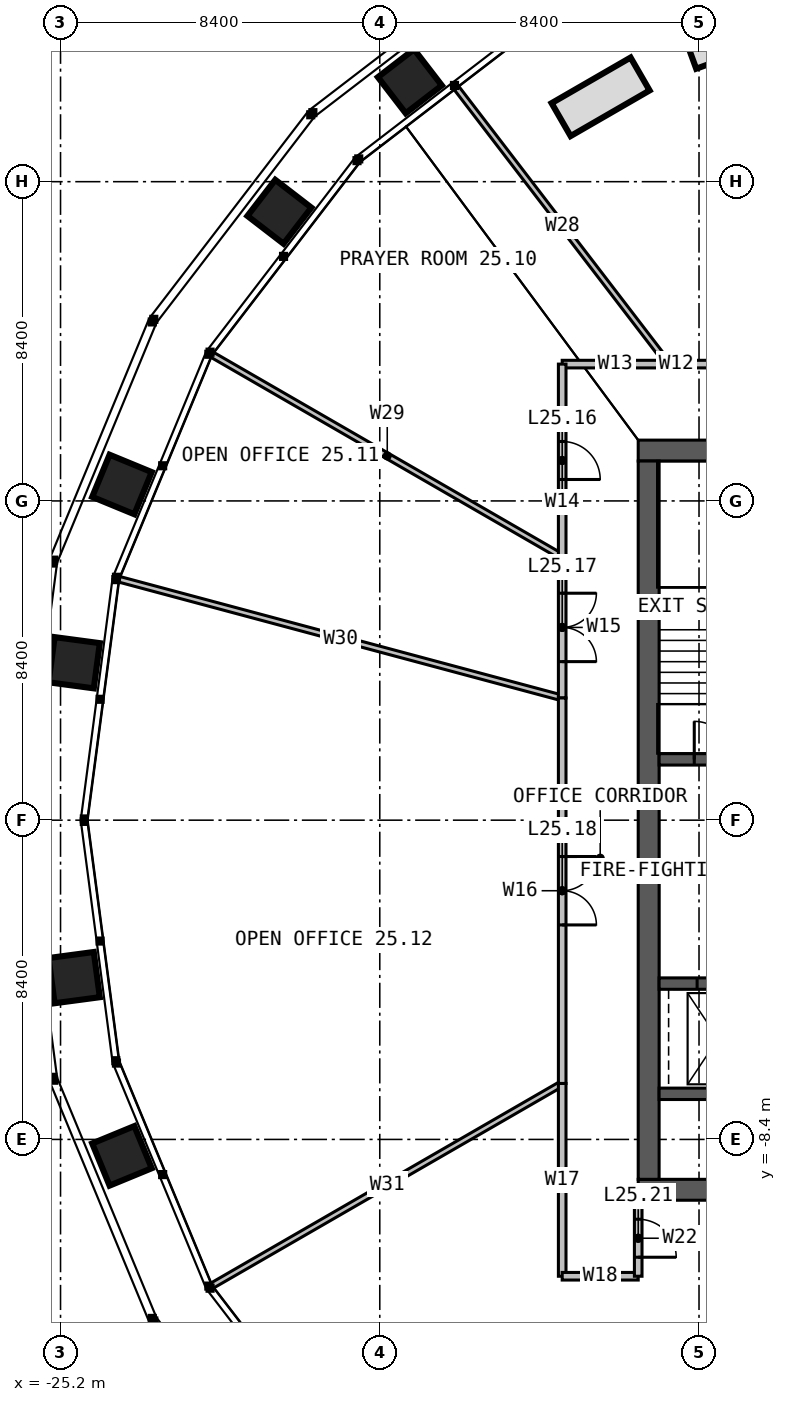
"""IFC4 building model, lengths in metres.
Left out: names, types, materials, properties, quantities, classifications, styles, units other than length and angle.
Written with IfcOpenShell. Run it as: python <this file> out.ifc"""

import sys

from ifc_helpers import new_model, si_unit, direction, frame, frame_2d, origin, place, context, subcontext, project, spatial, rectangle, extrude, element, fill, save


model = new_model("IFC4")
c1 = context("Model", 3, precision=1e-05, world=origin(), true_north=direction((0.0, 1.0)))
c2 = subcontext(c1, "Body", "Model", "MODEL_VIEW")
j1 = project(units=[si_unit("LENGTHUNIT", "METRE"), si_unit("PLANEANGLEUNIT", "RADIAN")], contexts=[c1])
p1 = place(None, origin())
s1 = spatial("IfcSite", under=j1, at=p1, CompositionType="ELEMENT")
p2 = place(p1, origin())
s2 = spatial("IfcBuilding", under=s1, at=p2, CompositionType="ELEMENT")
p3 = place(p2, frame((0.0, 0.0, 106.0)))
s3 = spatial("IfcBuildingStorey", under=s2, at=p3, CompositionType="ELEMENT", Elevation=106.0)
p4 = place(p3, frame((-10.0, 9.725, 0.0), z_axis=(0.0, 0.0, 1.0), x_axis=(1.0, 0.0, 0.0)))
e1 = element("IfcWall", 1, at=p4, inside=s3, PredefinedType="SOLIDWALL", context=c2, shape_type="SweptSolid", body=[
    extrude(rectangle(XDim=20.0, YDim=0.55, at=frame_2d((10.0, 0.0))), origin(), (0.0, 0.0, 1.0), 4.0),
])
p5 = place(p4, frame((9.4, 0.0, 0.0)))
e2 = element("IfcOpeningElement", 2, at=p5, cuts=e1, PredefinedType="OPENING", context=c2, shape_type="SweptSolid", body=[
    extrude(rectangle(XDim=1.2, YDim=2.2, at=frame_2d((0.6, 1.1))), frame((0.0, 0.285, 0.0), z_axis=(0.0, -1.0, 0.0), x_axis=(1.0, 0.0, 0.0)), (0.0, 0.0, 1.0), 0.57),
])
p6 = place(p3, frame((10.0, -9.725, 0.0), z_axis=(0.0, 0.0, 1.0), x_axis=(-1.0, 0.0, 0.0)))
e3 = element("IfcWall", 3, at=p6, inside=s3, PredefinedType="SOLIDWALL", context=c2, shape_type="SweptSolid", body=[
    extrude(rectangle(XDim=20.0, YDim=0.55, at=frame_2d((10.0, 0.0))), origin(), (0.0, 0.0, 1.0), 4.0),
])
p7 = place(p6, frame((6.875, 0.0, 0.0)))
e4 = element("IfcOpeningElement", 4, at=p7, cuts=e3, PredefinedType="OPENING", context=c2, shape_type="SweptSolid", body=[
    extrude(rectangle(XDim=1.2, YDim=2.2, at=frame_2d((0.6, 1.1))), frame((0.0, 0.285, 0.0), z_axis=(0.0, -1.0, 0.0), x_axis=(1.0, 0.0, 0.0)), (0.0, 0.0, 1.0), 0.57),
])
p8 = place(p3, frame((-9.725, 9.45, 0.0), z_axis=(0.0, 0.0, 1.0), x_axis=(0.0, -1.0, 0.0)))
e5 = element("IfcWall", 5, at=p8, inside=s3, PredefinedType="SOLIDWALL", context=c2, shape_type="SweptSolid", body=[
    extrude(rectangle(XDim=18.9, YDim=0.55, at=frame_2d((9.45, 0.0))), origin(), (0.0, 0.0, 1.0), 4.0),
])
p9 = place(p3, frame((-9.45, 1.6, 0.0), z_axis=(0.0, 0.0, 1.0), x_axis=(1.0, 0.0, 0.0)))
e6 = element("IfcWall", 6, at=p9, inside=s3, PredefinedType="SOLIDWALL", context=c2, shape_type="SweptSolid", body=[
    extrude(rectangle(XDim=2.85, YDim=0.3, at=frame_2d((1.425, 0.0))), origin(), (0.0, 0.0, 1.0), 4.0),
])
p10 = place(p9, frame((0.925, 0.0, 0.0)))
e7 = element("IfcOpeningElement", 7, at=p10, cuts=e6, PredefinedType="OPENING", context=c2, shape_type="SweptSolid", body=[
    extrude(rectangle(XDim=1.0, YDim=2.2, at=frame_2d((0.5, 1.1))), frame((0.0, 0.16, 0.0), z_axis=(0.0, -1.0, 0.0), x_axis=(1.0, 0.0, 0.0)), (0.0, 0.0, 1.0), 0.32),
])
p11 = place(p3, frame((-9.45, -4.3, 0.0), z_axis=(0.0, 0.0, 1.0), x_axis=(1.0, 0.0, 0.0)))
e8 = element("IfcWall", 8, at=p11, inside=s3, PredefinedType="SOLIDWALL", context=c2, shape_type="SweptSolid", body=[
    extrude(rectangle(XDim=2.85, YDim=0.3, at=frame_2d((1.425, 0.0))), origin(), (0.0, 0.0, 1.0), 4.0),
])
p12 = place(p11, frame((1.0, 0.0, 0.0)))
e9 = element("IfcOpeningElement", 9, at=p12, cuts=e8, PredefinedType="OPENING", context=c2, shape_type="SweptSolid", body=[
    extrude(rectangle(XDim=1.1, YDim=2.2, at=frame_2d((0.55, 1.1))), frame((0.0, 0.16, 0.0), z_axis=(0.0, -1.0, 0.0), x_axis=(1.0, 0.0, 0.0)), (0.0, 0.0, 1.0), 0.32),
])
p13 = place(p3, frame((-9.45, -7.2, 0.0), z_axis=(0.0, 0.0, 1.0), x_axis=(1.0, 0.0, 0.0)))
e10 = element("IfcWall", 10, at=p13, inside=s3, PredefinedType="SOLIDWALL", context=c2, shape_type="SweptSolid", body=[
    extrude(rectangle(XDim=2.85, YDim=0.3, at=frame_2d((1.425, 0.0))), origin(), (0.0, 0.0, 1.0), 4.0),
])
p14 = place(p3, frame((-9.207, 12.0, 0.0), z_axis=(0.0, 0.0, 1.0), x_axis=(-0.608747337947, 0.793364152544, 0.0)))
e11 = element("IfcWall", 11, at=p14, inside=s3, PredefinedType="PARTITIONING", context=c2, shape_type="SweptSolid", body=[
    extrude(rectangle(XDim=9.152, YDim=0.15, at=frame_2d((4.576, 0.0))), origin(), (0.0, 0.0, 1.0), 2.79),
])
p15 = place(p3, frame((-12.0, 6.928, 0.0), z_axis=(0.0, 0.0, 1.0), x_axis=(-0.866024197053, 0.500002090115, 0.0)))
e12 = element("IfcWall", 12, at=p15, inside=s3, PredefinedType="PARTITIONING", context=c2, shape_type="SweptSolid", body=[
    extrude(rectangle(XDim=10.631, YDim=0.15, at=frame_2d((5.315, 0.0))), origin(), (0.0, 0.0, 1.0), 2.79),
])
p16 = place(p3, frame((-12.0, 3.215, 0.0), z_axis=(0.0, 0.0, 1.0), x_axis=(-0.965926913807, 0.258814986396, 0.0)))
e13 = element("IfcWall", 13, at=p16, inside=s3, PredefinedType="PARTITIONING", context=c2, shape_type="SweptSolid", body=[
    extrude(rectangle(XDim=12.064, YDim=0.15, at=frame_2d((6.032, 0.0))), origin(), (0.0, 0.0, 1.0), 2.79),
])
p17 = place(p3, frame((-12.0, -6.928, 0.0), z_axis=(0.0, 0.0, 1.0), x_axis=(-0.866024197053, -0.500002090115, 0.0)))
e14 = element("IfcWall", 14, at=p17, inside=s3, PredefinedType="PARTITIONING", context=c2, shape_type="SweptSolid", body=[
    extrude(rectangle(XDim=10.631, YDim=0.15, at=frame_2d((5.315, 0.0))), origin(), (0.0, 0.0, 1.0), 2.79),
])
p18 = place(p3, frame((1.579, 12.0, 0.0), z_axis=(0.0, 0.0, 1.0), x_axis=(-1.0, 0.0, 0.0)))
e15 = element("IfcWall", 15, at=p18, inside=s3, PredefinedType="PARTITIONING", context=c2, shape_type="SweptSolid", body=[
    extrude(rectangle(XDim=10.363, YDim=0.2, at=frame_2d((5.182, 0.0))), origin(), (0.0, 0.0, 1.0), 3.2),
])
p19 = place(p18, frame((4.493, 0.0, 0.0)))
e16 = element("IfcOpeningElement", 16, at=p19, cuts=e15, PredefinedType="OPENING", context=c2, shape_type="SweptSolid", body=[
    extrude(rectangle(XDim=1.8, YDim=2.2, at=frame_2d((0.9, 1.1))), frame((0.0, 0.11, 0.0), z_axis=(0.0, -1.0, 0.0), x_axis=(1.0, 0.0, 0.0)), (0.0, 0.0, 1.0), 0.22),
])
p20 = place(p3, frame((-8.784, 12.0, 0.0), z_axis=(0.0, 0.0, 1.0), x_axis=(-1.0, 0.0, 0.0)))
e17 = element("IfcWall", 17, at=p20, inside=s3, PredefinedType="PARTITIONING", context=c2, shape_type="SweptSolid", body=[
    extrude(rectangle(XDim=0.424, YDim=0.2, at=frame_2d((0.212, 0.0))), origin(), (0.0, 0.0, 1.0), 3.8),
])
p21 = place(p3, frame((-9.207, 12.0, 0.0), z_axis=(0.0, 0.0, 1.0), x_axis=(-1.0, 0.0, 0.0)))
e18 = element("IfcWall", 18, at=p21, inside=s3, PredefinedType="PARTITIONING", context=c2, shape_type="SweptSolid", body=[
    extrude(rectangle(XDim=2.793, YDim=0.2, at=frame_2d((1.396, 0.0))), origin(), (0.0, 0.0, 1.0), 3.8),
])
p22 = place(p3, frame((-12.0, 12.0, 0.0), z_axis=(0.0, 0.0, 1.0), x_axis=(0.0, -1.0, 0.0)))
e19 = element("IfcWall", 19, at=p22, inside=s3, PredefinedType="PARTITIONING", context=c2, shape_type="SweptSolid", body=[
    extrude(rectangle(XDim=5.072, YDim=0.2, at=frame_2d((2.536, 0.0))), origin(), (0.0, 0.0, 1.0), 3.8),
])
p23 = place(p22, frame((2.036, 0.0, 0.0)))
e20 = element("IfcOpeningElement", 20, at=p23, cuts=e19, PredefinedType="OPENING", context=c2, shape_type="SweptSolid", body=[
    extrude(rectangle(XDim=1.0, YDim=2.2, at=frame_2d((0.5, 1.1))), frame((0.0, 0.11, 0.0), z_axis=(0.0, -1.0, 0.0), x_axis=(1.0, 0.0, 0.0)), (0.0, 0.0, 1.0), 0.22),
])
p24 = place(p3, frame((-12.0, 6.928, 0.0), z_axis=(0.0, 0.0, 1.0), x_axis=(0.0, -1.0, 0.0)))
e21 = element("IfcWall", 21, at=p24, inside=s3, PredefinedType="PARTITIONING", context=c2, shape_type="SweptSolid", body=[
    extrude(rectangle(XDim=3.713, YDim=0.2, at=frame_2d((1.856, 0.0))), origin(), (0.0, 0.0, 1.0), 3.8),
])
p25 = place(p24, frame((0.956, 0.0, 0.0)))
e22 = element("IfcOpeningElement", 22, at=p25, cuts=e21, PredefinedType="OPENING", context=c2, shape_type="SweptSolid", body=[
    extrude(rectangle(XDim=1.8, YDim=2.2, at=frame_2d((0.9, 1.1))), frame((0.0, 0.11, 0.0), z_axis=(0.0, -1.0, 0.0), x_axis=(1.0, 0.0, 0.0)), (0.0, 0.0, 1.0), 0.22),
])
p26 = place(p3, frame((-12.0, 3.215, 0.0), z_axis=(0.0, 0.0, 1.0), x_axis=(0.0, -1.0, 0.0)))
e23 = element("IfcWall", 23, at=p26, inside=s3, PredefinedType="PARTITIONING", context=c2, shape_type="SweptSolid", body=[
    extrude(rectangle(XDim=10.144, YDim=0.2, at=frame_2d((5.072, 0.0))), origin(), (0.0, 0.0, 1.0), 3.8),
])
p27 = place(p26, frame((4.172, 0.0, 0.0)))
e24 = element("IfcOpeningElement", 24, at=p27, cuts=e23, PredefinedType="OPENING", context=c2, shape_type="SweptSolid", body=[
    extrude(rectangle(XDim=1.8, YDim=2.2, at=frame_2d((0.9, 1.1))), frame((0.0, 0.11, 0.0), z_axis=(0.0, -1.0, 0.0), x_axis=(1.0, 0.0, 0.0)), (0.0, 0.0, 1.0), 0.22),
])
p28 = place(p3, frame((-12.0, -6.928, 0.0), z_axis=(0.0, 0.0, 1.0), x_axis=(0.0, -1.0, 0.0)))
e25 = element("IfcWall", 25, at=p28, inside=s3, PredefinedType="PARTITIONING", context=c2, shape_type="SweptSolid", body=[
    extrude(rectangle(XDim=5.072, YDim=0.2, at=frame_2d((2.536, 0.0))), origin(), (0.0, 0.0, 1.0), 3.8),
])
p29 = place(p3, frame((-12.0, -12.0, 0.0), z_axis=(0.0, 0.0, 1.0), x_axis=(1.0, 0.0, 0.0)))
e26 = element("IfcWall", 26, at=p29, inside=s3, PredefinedType="PARTITIONING", context=c2, shape_type="SweptSolid", body=[
    extrude(rectangle(XDim=2.0, YDim=0.2, at=frame_2d((1.0, 0.0))), origin(), (0.0, 0.0, 1.0), 3.8),
])
p30 = place(p3, frame((-10.0, -10.0, 0.0), z_axis=(0.0, 0.0, 1.0), x_axis=(0.0, -1.0, 0.0)))
e27 = element("IfcWall", 27, at=p30, inside=s3, PredefinedType="PARTITIONING", context=c2, shape_type="SweptSolid", body=[
    extrude(rectangle(XDim=2.0, YDim=0.2, at=frame_2d((1.0, 0.0))), origin(), (0.0, 0.0, 1.0), 3.8),
])
p31 = place(p30, frame((0.5, 0.0, 0.0)))
e28 = element("IfcOpeningElement", 28, at=p31, cuts=e27, PredefinedType="OPENING", context=c2, shape_type="SweptSolid", body=[
    extrude(rectangle(XDim=1.0, YDim=2.2, at=frame_2d((0.5, 1.1))), frame((0.0, 0.11, 0.0), z_axis=(0.0, -1.0, 0.0), x_axis=(1.0, 0.0, 0.0)), (0.0, 0.0, 1.0), 0.22),
])
p32 = place(p10, origin())
e29 = element("IfcDoor", 29, at=p32, inside=s3, OperationType="SINGLE_SWING_LEFT", PredefinedType="DOOR", context=c2, shape_type="SweptSolid", body=[
    extrude(rectangle(XDim=1.0, YDim=2.2, at=frame_2d((0.5, 1.1))), frame((0.0, 0.025, 0.0), z_axis=(0.0, -1.0, 0.0), x_axis=(1.0, 0.0, 0.0)), (0.0, 0.0, 1.0), 0.05),
])
fill(e7, e29)
p33 = place(p12, origin())
e30 = element("IfcDoor", 30, at=p33, inside=s3, OperationType="SLIDING_TO_LEFT", PredefinedType="DOOR", context=c2, shape_type="SweptSolid", body=[
    extrude(rectangle(XDim=1.1, YDim=2.2, at=frame_2d((0.55, 1.1))), frame((0.0, 0.025, 0.0), z_axis=(0.0, -1.0, 0.0), x_axis=(1.0, 0.0, 0.0)), (0.0, 0.0, 1.0), 0.05),
])
fill(e9, e30)
p34 = place(p23, origin())
e31 = element("IfcDoor", 31, at=p34, inside=s3, OperationType="SINGLE_SWING_RIGHT", PredefinedType="DOOR", context=c2, shape_type="SweptSolid", body=[
    extrude(rectangle(XDim=1.0, YDim=2.2, at=frame_2d((0.5, 1.1))), frame((0.0, 0.025, 0.0), z_axis=(0.0, -1.0, 0.0), x_axis=(1.0, 0.0, 0.0)), (0.0, 0.0, 1.0), 0.05),
])
fill(e20, e31)
p35 = place(p25, origin())
e32 = element("IfcDoor", 32, at=p35, inside=s3, OperationType="DOUBLE_DOOR_SINGLE_SWING", PredefinedType="DOOR", context=c2, shape_type="SweptSolid", body=[
    extrude(rectangle(XDim=1.8, YDim=2.2, at=frame_2d((0.9, 1.1))), frame((0.0, 0.025, 0.0), z_axis=(0.0, -1.0, 0.0), x_axis=(1.0, 0.0, 0.0)), (0.0, 0.0, 1.0), 0.05),
])
fill(e22, e32)
p36 = place(p27, origin())
e33 = element("IfcDoor", 33, at=p36, inside=s3, OperationType="DOUBLE_DOOR_SINGLE_SWING", PredefinedType="DOOR", context=c2, shape_type="SweptSolid", body=[
    extrude(rectangle(XDim=1.8, YDim=2.2, at=frame_2d((0.9, 1.1))), frame((0.0, 0.025, 0.0), z_axis=(0.0, -1.0, 0.0), x_axis=(1.0, 0.0, 0.0)), (0.0, 0.0, 1.0), 0.05),
])
fill(e24, e33)
p37 = place(p31, origin())
e34 = element("IfcDoor", 34, at=p37, inside=s3, OperationType="SINGLE_SWING_RIGHT", PredefinedType="DOOR", context=c2, shape_type="SweptSolid", body=[
    extrude(rectangle(XDim=1.0, YDim=2.2, at=frame_2d((0.5, 1.1))), frame((0.0, 0.025, 0.0), z_axis=(0.0, -1.0, 0.0), x_axis=(1.0, 0.0, 0.0)), (0.0, 0.0, 1.0), 0.05),
])
fill(e28, e34)
save(model, sys.argv[1])
